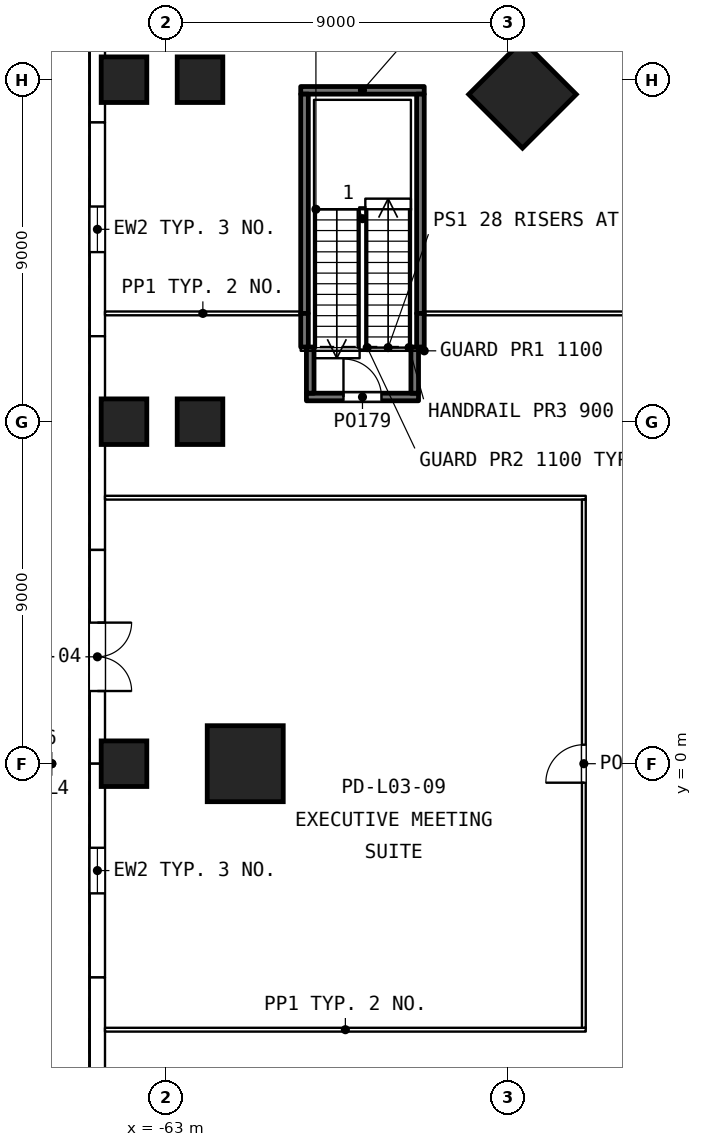
"""IFC4 building model, lengths in metres.
Left out: names, types, materials, properties, quantities, classifications, styles, units other than length and angle.
Written with IfcOpenShell. Run it as: python <this file> out.ifc"""

import sys

from ifc_helpers import new_model, si_unit, direction, frame, frame_2d, origin, origin_2d, place, context, subcontext, project, spatial, rectangle, extrude, element, fill, save


model = new_model("IFC4")
c1 = context("Model", 3, precision=1e-05, world=origin(), true_north=direction((0.0, 1.0)))
c2 = subcontext(c1, "Body", "Model", "MODEL_VIEW")
j1 = project(units=[si_unit("LENGTHUNIT", "METRE"), si_unit("PLANEANGLEUNIT", "RADIAN")], contexts=[c1])
p1 = place(None, origin())
s1 = spatial("IfcSite", under=j1, at=p1, CompositionType="ELEMENT")
p2 = place(p1, origin())
s2 = spatial("IfcBuilding", under=s1, at=p2, CompositionType="ELEMENT")
p3 = place(p2, frame((0.0, 0.0, 18.0)))
s3 = spatial("IfcBuildingStorey", under=s2, at=p3, CompositionType="ELEMENT", Elevation=18.0)
for number, where, z_axis, x_axis in (
    (1, (-64.1, 0.0, 0.0), (0.0, 0.0, 1.0), (1.0, 0.0, 0.0)),
    (2, (-64.1, 9.0, 0.0), (0.0, 0.0, 1.0), (1.0, 0.0, 0.0)),
    (3, (-64.1, 18.0, 0.0), (0.0, 0.0, 1.0), (1.0, 0.0, 0.0)),
    (4, (-62.1, 9.0, 0.0), (0.0, 0.0, 1.0), (1.0, 0.0, 0.0)),
    (5, (-62.1, 18.0, 0.0), (0.0, 0.0, 1.0), (1.0, 0.0, 0.0)),
):
    element("IfcColumn", number, at=place(p3, frame(where, z_axis=z_axis, x_axis=x_axis)), inside=s3, PredefinedType="COLUMN", context=c2, shape_type="SweptSolid", body=[
        extrude(rectangle(XDim=1.2, YDim=1.2, at=origin_2d()), origin(), (0.0, 0.0, 1.0), 4.8),
    ])
for number, where, z_axis, x_axis in (
    (6, (-53.614, 17.614, 0.0), (0.0, 0.0, 1.0), (-0.707, 0.707, 0.0)),
    (7, (-60.91, 0.0, 0.0), (0.0, 0.0, 1.0), (-1.0, 0.0, 0.0)),
):
    element("IfcColumn", number, at=place(p3, frame(where, z_axis=z_axis, x_axis=x_axis)), inside=s3, PredefinedType="COLUMN", context=c2, shape_type="SweptSolid", body=[
        extrude(rectangle(XDim=2.0, YDim=2.0, at=origin_2d()), origin(), (0.0, 0.0, 1.0), 4.8),
    ])
p4 = place(p3, frame((-64.8, 22.5, 0.0), z_axis=(0.0, 0.0, 1.0), x_axis=(0.0, -1.0, 0.0)))
e8 = element("IfcWall", 8, at=p4, inside=s3, PredefinedType="SOLIDWALL", context=c2, shape_type="SweptSolid", body=[
    extrude(rectangle(XDim=5.625, YDim=0.4, at=frame_2d((2.812, 0.0))), origin(), (0.0, 0.0, 1.0), 4.5),
])
p5 = place(p4, frame((2.212, 0.0, 1.1)))
e9 = element("IfcOpeningElement", 9, at=p5, cuts=e8, PredefinedType="OPENING", context=c2, shape_type="SweptSolid", body=[
    extrude(rectangle(XDim=1.2, YDim=1.8, at=frame_2d((0.6, 0.9))), frame((0.0, 0.21, 0.0), z_axis=(0.0, -1.0, 0.0), x_axis=(1.0, 0.0, 0.0)), (0.0, 0.0, 1.0), 0.42),
])
p6 = place(p3, frame((-64.8, 16.875, 0.0), z_axis=(0.0, 0.0, 1.0), x_axis=(0.0, -1.0, 0.0)))
e10 = element("IfcWall", 10, at=p6, inside=s3, PredefinedType="SOLIDWALL", context=c2, shape_type="SweptSolid", body=[
    extrude(rectangle(XDim=5.625, YDim=0.4, at=frame_2d((2.812, 0.0))), origin(), (0.0, 0.0, 1.0), 4.5),
])
p7 = place(p6, frame((2.212, 0.0, 1.1)))
e11 = element("IfcOpeningElement", 11, at=p7, cuts=e10, PredefinedType="OPENING", context=c2, shape_type="SweptSolid", body=[
    extrude(rectangle(XDim=1.2, YDim=1.8, at=frame_2d((0.6, 0.9))), frame((0.0, 0.21, 0.0), z_axis=(0.0, -1.0, 0.0), x_axis=(1.0, 0.0, 0.0)), (0.0, 0.0, 1.0), 0.42),
])
p8 = place(p3, frame((-64.8, 11.25, 0.0), z_axis=(0.0, 0.0, 1.0), x_axis=(0.0, -1.0, 0.0)))
e12 = element("IfcWall", 12, at=p8, inside=s3, PredefinedType="SOLIDWALL", context=c2, shape_type="SweptSolid", body=[
    extrude(rectangle(XDim=5.625, YDim=0.4, at=frame_2d((2.812, 0.0))), origin(), (0.0, 0.0, 1.0), 4.5),
])
p9 = place(p3, frame((-64.8, 5.625, 0.0), z_axis=(0.0, 0.0, 1.0), x_axis=(0.0, -1.0, 0.0)))
e13 = element("IfcWall", 13, at=p9, inside=s3, PredefinedType="SOLIDWALL", context=c2, shape_type="SweptSolid", body=[
    extrude(rectangle(XDim=5.625, YDim=0.4, at=frame_2d((2.812, 0.0))), origin(), (0.0, 0.0, 1.0), 4.5),
])
p10 = place(p9, frame((1.913, 0.0, 0.0)))
e14 = element("IfcOpeningElement", 14, at=p10, cuts=e13, PredefinedType="OPENING", context=c2, shape_type="SweptSolid", body=[
    extrude(rectangle(XDim=1.8, YDim=2.4, at=frame_2d((0.9, 1.2))), frame((0.0, 0.21, 0.0), z_axis=(0.0, -1.0, 0.0), x_axis=(1.0, 0.0, 0.0)), (0.0, 0.0, 1.0), 0.42),
])
p11 = place(p3, frame((-64.8, 0.0, 0.0), z_axis=(0.0, 0.0, 1.0), x_axis=(0.0, -1.0, 0.0)))
e15 = element("IfcWall", 15, at=p11, inside=s3, PredefinedType="SOLIDWALL", context=c2, shape_type="SweptSolid", body=[
    extrude(rectangle(XDim=5.625, YDim=0.4, at=frame_2d((2.812, 0.0))), origin(), (0.0, 0.0, 1.0), 4.5),
])
p12 = place(p11, frame((2.212, 0.0, 1.1)))
e16 = element("IfcOpeningElement", 16, at=p12, cuts=e15, PredefinedType="OPENING", context=c2, shape_type="SweptSolid", body=[
    extrude(rectangle(XDim=1.2, YDim=1.8, at=frame_2d((0.6, 0.9))), frame((0.0, 0.21, 0.0), z_axis=(0.0, -1.0, 0.0), x_axis=(1.0, 0.0, 0.0)), (0.0, 0.0, 1.0), 0.42),
])
p13 = place(p3, frame((-64.8, -5.625, 0.0), z_axis=(0.0, 0.0, 1.0), x_axis=(0.0, -1.0, 0.0)))
e17 = element("IfcWall", 17, at=p13, inside=s3, PredefinedType="SOLIDWALL", context=c2, shape_type="SweptSolid", body=[
    extrude(rectangle(XDim=5.625, YDim=0.4, at=frame_2d((2.812, 0.0))), origin(), (0.0, 0.0, 1.0), 4.5),
])
p14 = place(p3, frame((-59.45, 17.72, 0.0), z_axis=(0.0, 0.0, 1.0), x_axis=(1.0, 0.0, 0.0)))
e18 = element("IfcWall", 18, at=p14, inside=s3, PredefinedType="SOLIDWALL", context=c2, shape_type="SweptSolid", body=[
    extrude(rectangle(XDim=3.25, YDim=0.2, at=frame_2d((1.625, 0.0))), origin(), (0.0, 0.0, 1.0), 4.5),
])
for number, where, z_axis, x_axis in (
    (19, (-59.35, 11.85, 0.0), (0.0, 0.0, 1.0), (0.0, 1.0, 0.0)),
    (20, (-56.3, 11.85, 0.0), (0.0, 0.0, 1.0), (0.0, 1.0, 0.0)),
):
    element("IfcWall", number, at=place(p3, frame(where, z_axis=z_axis, x_axis=x_axis)), inside=s3, PredefinedType="SOLIDWALL", context=c2, shape_type="SweptSolid", body=[
        extrude(rectangle(XDim=5.77, YDim=0.2, at=frame_2d((2.885, 0.0))), origin(), (0.0, 0.0, 1.0), 4.5),
    ])
p15 = place(p3, frame((-59.3, 9.65, 0.0), z_axis=(0.0, 0.0, 1.0), x_axis=(1.0, 0.0, 0.0)))
e21 = element("IfcWall", 21, at=p15, inside=s3, PredefinedType="SOLIDWALL", context=c2, shape_type="SweptSolid", body=[
    extrude(rectangle(XDim=2.95, YDim=0.2, at=frame_2d((1.475, 0.0))), origin(), (0.0, 0.0, 1.0), 4.5),
])
p16 = place(p15, frame((0.975, 0.0, 0.0)))
e22 = element("IfcOpeningElement", 22, at=p16, cuts=e21, PredefinedType="OPENING", context=c2, shape_type="SweptSolid", body=[
    extrude(rectangle(XDim=1.0, YDim=2.1, at=frame_2d((0.5, 1.05))), frame((0.0, 0.11, 0.0), z_axis=(0.0, -1.0, 0.0), x_axis=(1.0, 0.0, 0.0)), (0.0, 0.0, 1.0), 0.22),
])
p17 = place(p3, frame((-59.35, 10.965, 0.0), z_axis=(0.0, 0.0, 1.0), x_axis=(0.0, 1.0, 0.0)))
e23 = element("IfcWall", 23, at=p17, inside=s3, PredefinedType="SOLIDWALL", context=c2, shape_type="SweptSolid", body=[
    extrude(rectangle(XDim=0.885, YDim=0.2, at=frame_2d((0.442, 0.0))), origin(), (0.0, 0.0, 1.0), 4.5),
])
for number, where, z_axis, x_axis in (
    (24, (-59.2, 9.75, 0.0), (0.0, 0.0, 1.0), (0.0, 1.0, 0.0)),
    (25, (-56.45, 9.75, 0.0), (0.0, 0.0, 1.0), (0.0, 1.0, 0.0)),
):
    element("IfcWall", number, at=place(p3, frame(where, z_axis=z_axis, x_axis=x_axis)), inside=s3, PredefinedType="SOLIDWALL", context=c2, shape_type="SweptSolid", body=[
        extrude(rectangle(XDim=1.215, YDim=0.2, at=frame_2d((0.607, 0.0))), origin(), (0.0, 0.0, 1.0), 4.5),
    ])
p18 = place(p3, frame((-56.3, 10.965, 0.0), z_axis=(0.0, 0.0, 1.0), x_axis=(0.0, 1.0, 0.0)))
e26 = element("IfcWall", 26, at=p18, inside=s3, PredefinedType="SOLIDWALL", context=c2, shape_type="SweptSolid", body=[
    extrude(rectangle(XDim=0.885, YDim=0.2, at=frame_2d((0.442, 0.0))), origin(), (0.0, 0.0, 1.0), 4.5),
])
p19 = place(p3, frame((-64.6, 11.85, 0.0), z_axis=(0.0, 0.0, 1.0), x_axis=(1.0, 0.0, 0.0)))
e27 = element("IfcWall", 27, at=p19, inside=s3, PredefinedType="PARTITIONING", context=c2, shape_type="SweptSolid", body=[
    extrude(rectangle(XDim=5.15, YDim=0.1, at=frame_2d((2.575, 0.0))), origin(), (0.0, 0.0, 1.0), 4.5),
])
p20 = place(p3, frame((-56.2, 11.85, 0.0), z_axis=(0.0, 0.0, 1.0), x_axis=(1.0, 0.0, 0.0)))
e28 = element("IfcWall", 28, at=p20, inside=s3, PredefinedType="PARTITIONING", context=c2, shape_type="SweptSolid", body=[
    extrude(rectangle(XDim=36.1, YDim=0.1, at=frame_2d((18.05, 0.0))), origin(), (0.0, 0.0, 1.0), 4.5),
])
p21 = place(p20, frame((17.15, 0.0, 0.0)))
e29 = element("IfcOpeningElement", 29, at=p21, cuts=e28, PredefinedType="OPENING", context=c2, shape_type="SweptSolid", body=[
    extrude(rectangle(XDim=1.8, YDim=2.1, at=frame_2d((0.9, 1.05))), frame((0.0, 0.06, 0.0), z_axis=(0.0, -1.0, 0.0), x_axis=(1.0, 0.0, 0.0)), (0.0, 0.0, 1.0), 0.12),
])
for number, where, z_axis, x_axis in (
    (30, (-64.6, -7.0, 0.0), (0.0, 0.0, 1.0), (1.0, 0.0, 0.0)),
    (31, (-64.6, 7.0, 0.0), (0.0, 0.0, 1.0), (1.0, 0.0, 0.0)),
):
    element("IfcWall", number, at=place(p3, frame(where, z_axis=z_axis, x_axis=x_axis)), inside=s3, PredefinedType="PARTITIONING", context=c2, shape_type="SweptSolid", body=[
        extrude(rectangle(XDim=12.65, YDim=0.1, at=frame_2d((6.325, 0.0))), origin(), (0.0, 0.0, 1.0), 4.5),
    ])
p22 = place(p3, frame((-52.0, -6.95, 0.0), z_axis=(0.0, 0.0, 1.0), x_axis=(0.0, 1.0, 0.0)))
e32 = element("IfcWall", 32, at=p22, inside=s3, PredefinedType="PARTITIONING", context=c2, shape_type="SweptSolid", body=[
    extrude(rectangle(XDim=13.9, YDim=0.1, at=frame_2d((6.95, 0.0))), origin(), (0.0, 0.0, 1.0), 4.5),
])
p23 = place(p22, frame((6.45, 0.0, 0.0)))
e33 = element("IfcOpeningElement", 33, at=p23, cuts=e32, PredefinedType="OPENING", context=c2, shape_type="SweptSolid", body=[
    extrude(rectangle(XDim=1.0, YDim=2.1, at=frame_2d((0.5, 1.05))), frame((0.0, 0.06, 0.0), z_axis=(0.0, -1.0, 0.0), x_axis=(1.0, 0.0, 0.0)), (0.0, 0.0, 1.0), 0.12),
])
p24 = place(p7, origin())
e34 = element("IfcWindow", 34, at=p24, inside=s3, PartitioningType="SINGLE_PANEL", PredefinedType="WINDOW", context=c2, shape_type="SweptSolid", body=[
    extrude(rectangle(XDim=1.2, YDim=1.8, at=frame_2d((0.6, 0.9))), frame((0.0, 0.03, 0.0), z_axis=(0.0, -1.0, 0.0), x_axis=(1.0, 0.0, 0.0)), (0.0, 0.0, 1.0), 0.06),
])
fill(e11, e34)
p25 = place(p10, origin())
e35 = element("IfcDoor", 35, at=p25, inside=s3, OperationType="SINGLE_SWING_LEFT", PredefinedType="DOOR", context=c2, shape_type="SweptSolid", body=[
    extrude(rectangle(XDim=1.8, YDim=2.4, at=frame_2d((0.9, 1.2))), frame((0.0, 0.025, 0.0), z_axis=(0.0, -1.0, 0.0), x_axis=(1.0, 0.0, 0.0)), (0.0, 0.0, 1.0), 0.05),
])
fill(e14, e35)
p26 = place(p12, origin())
e36 = element("IfcWindow", 36, at=p26, inside=s3, PartitioningType="SINGLE_PANEL", PredefinedType="WINDOW", context=c2, shape_type="SweptSolid", body=[
    extrude(rectangle(XDim=1.2, YDim=1.8, at=frame_2d((0.6, 0.9))), frame((0.0, 0.03, 0.0), z_axis=(0.0, -1.0, 0.0), x_axis=(1.0, 0.0, 0.0)), (0.0, 0.0, 1.0), 0.06),
])
fill(e16, e36)
p27 = place(p16, origin())
e37 = element("IfcDoor", 37, at=p27, inside=s3, OperationType="SINGLE_SWING_LEFT", PredefinedType="DOOR", context=c2, shape_type="SweptSolid", body=[
    extrude(rectangle(XDim=1.0, YDim=2.1, at=frame_2d((0.5, 1.05))), frame((0.0, 0.025, 0.0), z_axis=(0.0, -1.0, 0.0), x_axis=(1.0, 0.0, 0.0)), (0.0, 0.0, 1.0), 0.05),
])
fill(e22, e37)
p28 = place(p23, origin())
e38 = element("IfcDoor", 38, at=p28, inside=s3, OperationType="SINGLE_SWING_LEFT", PredefinedType="DOOR", context=c2, shape_type="SweptSolid", body=[
    extrude(rectangle(XDim=1.0, YDim=2.1, at=frame_2d((0.5, 1.05))), frame((0.0, 0.025, 0.0), z_axis=(0.0, -1.0, 0.0), x_axis=(1.0, 0.0, 0.0)), (0.0, 0.0, 1.0), 0.05),
])
fill(e33, e38)
save(model, sys.argv[1])
